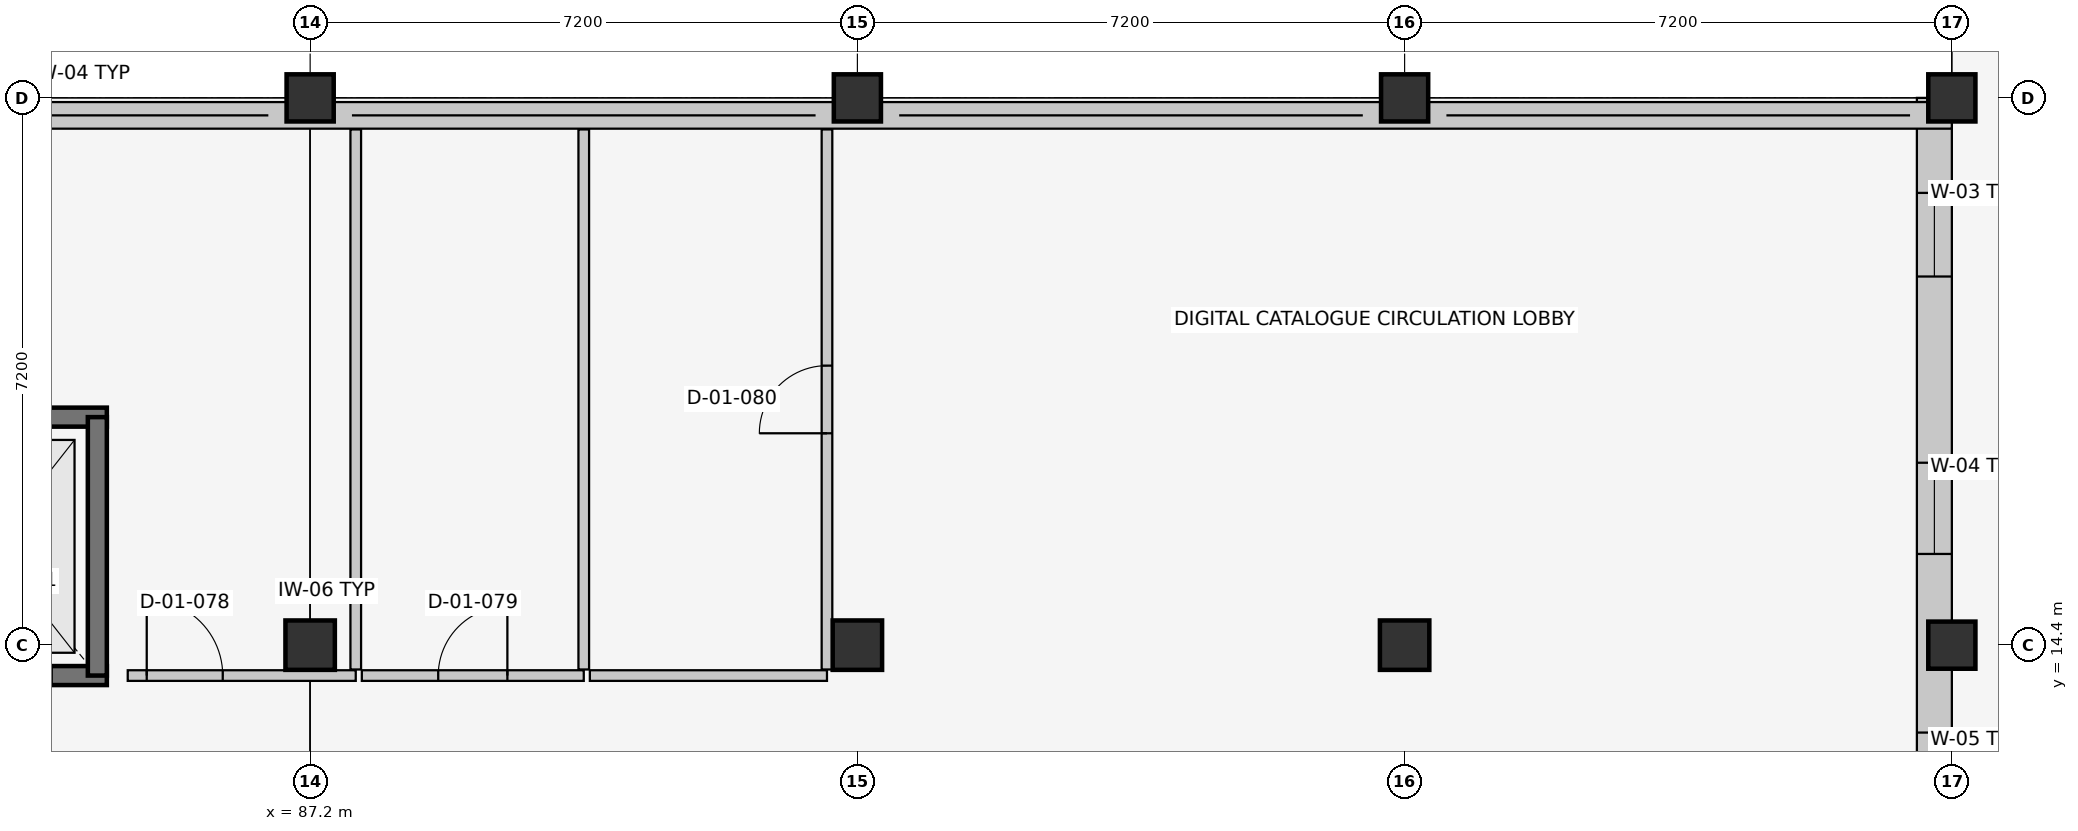
"""IFC4 building model, lengths in metres.
Left out: names, types, materials, properties, quantities, classifications, styles, units other than length and angle.
Written with IfcOpenShell. Run it as: python <this file> out.ifc"""

import sys

from ifc_helpers import new_model, si_unit, direction, frame, frame_2d, origin, origin_2d, place, context, subcontext, project, spatial, rectangle, extrude, element, fill, save


model = new_model("IFC4")
c1 = context("Model", 3, precision=1e-05, world=origin(), true_north=direction((0.0, 1.0)))
c2 = subcontext(c1, "Body", "Model", "MODEL_VIEW")
j1 = project(units=[si_unit("LENGTHUNIT", "METRE"), si_unit("PLANEANGLEUNIT", "RADIAN")], contexts=[c1])
p1 = place(None, origin())
s1 = spatial("IfcSite", under=j1, at=p1, CompositionType="ELEMENT")
p2 = place(p1, origin())
s2 = spatial("IfcBuilding", under=s1, at=p2, CompositionType="ELEMENT")
p3 = place(p2, frame((0.0, 0.0, 5.4)))
s3 = spatial("IfcBuildingStorey", under=s2, at=p3, CompositionType="ELEMENT", Elevation=5.4)
p4 = place(p3, frame((87.2, 14.4, 0.0), z_axis=(0.0, 0.0, 1.0), x_axis=(1.0, 0.0, 0.0)))
e1 = element("IfcColumn", 1, at=p4, inside=s3, PredefinedType="COLUMN", context=c2, shape_type="SweptSolid", body=[
    extrude(rectangle(XDim=0.65, YDim=0.65, at=origin_2d()), origin(), (0.0, 0.0, 1.0), 4.2),
])
p5 = place(p3, frame((87.2, 21.6, 0.0), z_axis=(0.0, 0.0, 1.0), x_axis=(1.0, 0.0, 0.0)))
e2 = element("IfcColumn", 2, at=p5, inside=s3, PredefinedType="COLUMN", context=c2, shape_type="SweptSolid", body=[
    extrude(rectangle(XDim=0.62, YDim=0.62, at=origin_2d()), origin(), (0.0, 0.0, 1.0), 4.2),
])
p6 = place(p3, frame((94.4, 14.4, 0.0), z_axis=(0.0, 0.0, 1.0), x_axis=(1.0, 0.0, 0.0)))
e3 = element("IfcColumn", 3, at=p6, inside=s3, PredefinedType="COLUMN", context=c2, shape_type="SweptSolid", body=[
    extrude(rectangle(XDim=0.65, YDim=0.65, at=origin_2d()), origin(), (0.0, 0.0, 1.0), 4.2),
])
p7 = place(p3, frame((94.4, 21.6, 0.0), z_axis=(0.0, 0.0, 1.0), x_axis=(1.0, 0.0, 0.0)))
e4 = element("IfcColumn", 4, at=p7, inside=s3, PredefinedType="COLUMN", context=c2, shape_type="SweptSolid", body=[
    extrude(rectangle(XDim=0.62, YDim=0.62, at=origin_2d()), origin(), (0.0, 0.0, 1.0), 4.2),
])
p8 = place(p3, frame((101.6, 14.4, 0.0), z_axis=(0.0, 0.0, 1.0), x_axis=(1.0, 0.0, 0.0)))
e5 = element("IfcColumn", 5, at=p8, inside=s3, PredefinedType="COLUMN", context=c2, shape_type="SweptSolid", body=[
    extrude(rectangle(XDim=0.65, YDim=0.65, at=origin_2d()), origin(), (0.0, 0.0, 1.0), 4.2),
])
for number, where, z_axis, x_axis in (
    (6, (101.6, 21.6, 0.0), (0.0, 0.0, 1.0), (1.0, 0.0, 0.0)),
    (7, (108.8, 14.4, 0.0), (0.0, 0.0, 1.0), (1.0, 0.0, 0.0)),
    (8, (108.8, 21.6, 0.0), (0.0, 0.0, 1.0), (1.0, 0.0, 0.0)),
):
    element("IfcColumn", number, at=place(p3, frame(where, z_axis=z_axis, x_axis=x_axis)), inside=s3, PredefinedType="COLUMN", context=c2, shape_type="SweptSolid", body=[
        extrude(rectangle(XDim=0.62, YDim=0.62, at=origin_2d()), origin(), (0.0, 0.0, 1.0), 4.2),
    ])
p9 = place(p3, frame((108.57, 21.6, 0.0), z_axis=(0.0, 0.0, 1.0), x_axis=(0.0, -1.0, 0.0)))
e9 = element("IfcWall", 9, at=p9, inside=s3, PredefinedType="SOLIDWALL", context=c2, shape_type="SweptSolid", body=[
    extrude(rectangle(XDim=21.6, YDim=0.46, at=frame_2d((10.8, 0.0))), origin(), (0.0, 0.0, 1.0), 3.215),
])
p10 = place(p9, frame((1.25, 0.0, 0.9)))
e10 = element("IfcOpeningElement", 10, at=p10, cuts=e9, PredefinedType="OPENING", context=c2, shape_type="SweptSolid", body=[
    extrude(rectangle(XDim=1.1, YDim=1.35, at=frame_2d((0.55, 0.675))), frame((0.0, 0.242, 0.0), z_axis=(0.0, -1.0, 0.0), x_axis=(1.0, 0.0, 0.0)), (0.0, 0.0, 1.0), 0.484),
])
p11 = place(p9, frame((4.8, 0.0, 0.9)))
e11 = element("IfcOpeningElement", 11, at=p11, cuts=e9, PredefinedType="OPENING", context=c2, shape_type="SweptSolid", body=[
    extrude(rectangle(XDim=1.2, YDim=1.35, at=frame_2d((0.6, 0.675))), frame((0.0, 0.242, 0.0), z_axis=(0.0, -1.0, 0.0), x_axis=(1.0, 0.0, 0.0)), (0.0, 0.0, 1.0), 0.484),
])
p12 = place(p9, frame((8.35, 0.0, 0.9)))
e12 = element("IfcOpeningElement", 12, at=p12, cuts=e9, PredefinedType="OPENING", context=c2, shape_type="SweptSolid", body=[
    extrude(rectangle(XDim=1.3, YDim=1.35, at=frame_2d((0.65, 0.675))), frame((0.0, 0.242, 0.0), z_axis=(0.0, -1.0, 0.0), x_axis=(1.0, 0.0, 0.0)), (0.0, 0.0, 1.0), 0.484),
])
p13 = place(p9, frame((11.9, 0.0, 0.9)))
e13 = element("IfcOpeningElement", 13, at=p13, cuts=e9, PredefinedType="OPENING", context=c2, shape_type="SweptSolid", body=[
    extrude(rectangle(XDim=1.4, YDim=1.35, at=frame_2d((0.7, 0.675))), frame((0.0, 0.242, 0.0), z_axis=(0.0, -1.0, 0.0), x_axis=(1.0, 0.0, 0.0)), (0.0, 0.0, 1.0), 0.484),
])
p14 = place(p9, frame((15.725, 0.0, 0.9)))
e14 = element("IfcOpeningElement", 14, at=p14, cuts=e9, PredefinedType="OPENING", context=c2, shape_type="SweptSolid", body=[
    extrude(rectangle(XDim=0.95, YDim=1.45, at=frame_2d((0.475, 0.725))), frame((0.0, 0.242, 0.0), z_axis=(0.0, -1.0, 0.0), x_axis=(1.0, 0.0, 0.0)), (0.0, 0.0, 1.0), 0.484),
])
p15 = place(p9, frame((19.275, 0.0, 0.9)))
e15 = element("IfcOpeningElement", 15, at=p15, cuts=e9, PredefinedType="OPENING", context=c2, shape_type="SweptSolid", body=[
    extrude(rectangle(XDim=1.05, YDim=1.45, at=frame_2d((0.525, 0.725))), frame((0.0, 0.242, 0.0), z_axis=(0.0, -1.0, 0.0), x_axis=(1.0, 0.0, 0.0)), (0.0, 0.0, 1.0), 0.484),
])
p16 = place(p3, frame((58.4, 21.37, 0.0), z_axis=(0.0, 0.0, 1.0), x_axis=(1.0, 0.0, 0.0)))
e16 = element("IfcWall", 16, at=p16, inside=s3, PredefinedType="SOLIDWALL", context=c2, shape_type="SweptSolid", body=[
    extrude(rectangle(XDim=50.4, YDim=0.35, at=frame_2d((25.2, 0.0))), origin(), (0.0, 0.0, 1.0), 0.85),
])
p17 = place(p3, frame((81.475, 14.0, 0.0), z_axis=(0.0, 0.0, 1.0), x_axis=(1.0, 0.0, 0.0)))
e17 = element("IfcWall", 17, at=p17, inside=s3, PredefinedType="SHEAR", context=c2, shape_type="SweptSolid", body=[
    extrude(rectangle(XDim=3.05, YDim=0.25, at=frame_2d((1.525, 0.0))), origin(), (0.0, 0.0, 1.0), 3.95),
])
p18 = place(p17, frame((0.725, 0.0, 0.0)))
e18 = element("IfcOpeningElement", 18, at=p18, cuts=e17, PredefinedType="OPENING", context=c2, shape_type="SweptSolid", body=[
    extrude(rectangle(XDim=1.6, YDim=2.3, at=frame_2d((0.8, 1.15))), frame((0.0, 0.137, 0.0), z_axis=(0.0, -1.0, 0.0), x_axis=(1.0, 0.0, 0.0)), (0.0, 0.0, 1.0), 0.274),
])
p19 = place(p3, frame((84.525, 17.4, 0.0), z_axis=(0.0, 0.0, 1.0), x_axis=(-1.0, 0.0, 0.0)))
e19 = element("IfcWall", 19, at=p19, inside=s3, PredefinedType="SHEAR", context=c2, shape_type="SweptSolid", body=[
    extrude(rectangle(XDim=3.05, YDim=0.25, at=frame_2d((1.525, 0.0))), origin(), (0.0, 0.0, 1.0), 3.95),
])
p20 = place(p3, frame((84.4, 14.0, 0.0), z_axis=(0.0, 0.0, 1.0), x_axis=(0.0, 1.0, 0.0)))
e20 = element("IfcWall", 20, at=p20, inside=s3, PredefinedType="SHEAR", context=c2, shape_type="SweptSolid", body=[
    extrude(rectangle(XDim=3.4, YDim=0.25, at=frame_2d((1.7, 0.0))), origin(), (0.0, 0.0, 1.0), 3.95),
])
p21 = place(p3, frame((84.8, 14.0, 0.0), z_axis=(0.0, 0.0, 1.0), x_axis=(1.0, 0.0, 0.0)))
e21 = element("IfcWall", 21, at=p21, inside=s3, PredefinedType="PARTITIONING", context=c2, shape_type="SweptSolid", body=[
    extrude(rectangle(XDim=3.0, YDim=0.14, at=frame_2d((1.5, 0.0))), origin(), (0.0, 0.0, 1.0), 3.95),
])
p22 = place(p21, frame((0.25, 0.0, 0.0)))
e22 = element("IfcOpeningElement", 22, at=p22, cuts=e21, PredefinedType="OPENING", context=c2, shape_type="SweptSolid", body=[
    extrude(rectangle(XDim=1.0, YDim=2.1, at=frame_2d((0.5, 1.05))), frame((0.0, 0.082, 0.0), z_axis=(0.0, -1.0, 0.0), x_axis=(1.0, 0.0, 0.0)), (0.0, 0.0, 1.0), 0.164),
])
p23 = place(p3, frame((87.8, 14.08, 0.0), z_axis=(0.0, 0.0, 1.0), x_axis=(0.0, 1.0, 0.0)))
e23 = element("IfcWall", 23, at=p23, inside=s3, PredefinedType="PARTITIONING", context=c2, shape_type="SweptSolid", body=[
    extrude(rectangle(XDim=7.105, YDim=0.14, at=frame_2d((3.552, 0.0))), origin(), (0.0, 0.0, 1.0), 3.95),
])
p24 = place(p3, frame((87.88, 14.0, 0.0), z_axis=(0.0, 0.0, 1.0), x_axis=(1.0, 0.0, 0.0)))
e24 = element("IfcWall", 24, at=p24, inside=s3, PredefinedType="PARTITIONING", context=c2, shape_type="SweptSolid", body=[
    extrude(rectangle(XDim=2.92, YDim=0.14, at=frame_2d((1.46, 0.0))), origin(), (0.0, 0.0, 1.0), 3.95),
])
p25 = place(p24, frame((1.005, 0.0, 0.0)))
e25 = element("IfcOpeningElement", 25, at=p25, cuts=e24, PredefinedType="OPENING", context=c2, shape_type="SweptSolid", body=[
    extrude(rectangle(XDim=0.91, YDim=2.06, at=frame_2d((0.455, 1.03))), frame((0.0, 0.082, 0.0), z_axis=(0.0, -1.0, 0.0), x_axis=(1.0, 0.0, 0.0)), (0.0, 0.0, 1.0), 0.164),
])
p26 = place(p3, frame((90.8, 14.08, 0.0), z_axis=(0.0, 0.0, 1.0), x_axis=(0.0, 1.0, 0.0)))
e26 = element("IfcWall", 26, at=p26, inside=s3, PredefinedType="PARTITIONING", context=c2, shape_type="SweptSolid", body=[
    extrude(rectangle(XDim=7.105, YDim=0.14, at=frame_2d((3.552, 0.0))), origin(), (0.0, 0.0, 1.0), 3.605),
])
p27 = place(p3, frame((90.88, 14.0, 0.0), z_axis=(0.0, 0.0, 1.0), x_axis=(1.0, 0.0, 0.0)))
e27 = element("IfcWall", 27, at=p27, inside=s3, PredefinedType="PARTITIONING", context=c2, shape_type="SweptSolid", body=[
    extrude(rectangle(XDim=3.12, YDim=0.14, at=frame_2d((1.56, 0.0))), origin(), (0.0, 0.0, 1.0), 3.95),
])
p28 = place(p3, frame((94.0, 14.08, 0.0), z_axis=(0.0, 0.0, 1.0), x_axis=(0.0, 1.0, 0.0)))
e28 = element("IfcWall", 28, at=p28, inside=s3, PredefinedType="PARTITIONING", context=c2, shape_type="SweptSolid", body=[
    extrude(rectangle(XDim=7.105, YDim=0.14, at=frame_2d((3.552, 0.0))), origin(), (0.0, 0.0, 1.0), 3.95),
])
p29 = place(p28, frame((3.107, 0.0, 0.0)))
e29 = element("IfcOpeningElement", 29, at=p29, cuts=e28, PredefinedType="OPENING", context=c2, shape_type="SweptSolid", body=[
    extrude(rectangle(XDim=0.89, YDim=2.05, at=frame_2d((0.445, 1.025))), frame((0.0, 0.082, 0.0), z_axis=(0.0, -1.0, 0.0), x_axis=(1.0, 0.0, 0.0)), (0.0, 0.0, 1.0), 0.164),
])
p30 = place(p10, origin())
e30 = element("IfcWindow", 30, at=p30, inside=s3, PartitioningType="SINGLE_PANEL", PredefinedType="WINDOW", context=c2, shape_type="SweptSolid", body=[
    extrude(rectangle(XDim=1.1, YDim=1.35, at=frame_2d((0.55, 0.675))), frame((0.0, 0.03, 0.0), z_axis=(0.0, -1.0, 0.0), x_axis=(1.0, 0.0, 0.0)), (0.0, 0.0, 1.0), 0.06),
])
fill(e10, e30)
p31 = place(p11, origin())
e31 = element("IfcWindow", 31, at=p31, inside=s3, PartitioningType="SINGLE_PANEL", PredefinedType="WINDOW", context=c2, shape_type="SweptSolid", body=[
    extrude(rectangle(XDim=1.2, YDim=1.35, at=frame_2d((0.6, 0.675))), frame((0.0, 0.03, 0.0), z_axis=(0.0, -1.0, 0.0), x_axis=(1.0, 0.0, 0.0)), (0.0, 0.0, 1.0), 0.06),
])
fill(e11, e31)
p32 = place(p12, origin())
e32 = element("IfcWindow", 32, at=p32, inside=s3, PartitioningType="SINGLE_PANEL", PredefinedType="WINDOW", context=c2, shape_type="SweptSolid", body=[
    extrude(rectangle(XDim=1.3, YDim=1.35, at=frame_2d((0.65, 0.675))), frame((0.0, 0.03, 0.0), z_axis=(0.0, -1.0, 0.0), x_axis=(1.0, 0.0, 0.0)), (0.0, 0.0, 1.0), 0.06),
])
fill(e12, e32)
p33 = place(p18, origin())
e33 = element("IfcDoor", 33, at=p33, inside=s3, OperationType="DOUBLE_DOOR_SLIDING", PredefinedType="DOOR", context=c2, shape_type="SweptSolid", body=[
    extrude(rectangle(XDim=1.6, YDim=2.3, at=frame_2d((0.8, 1.15))), frame((0.0, 0.025, 0.0), z_axis=(0.0, -1.0, 0.0), x_axis=(1.0, 0.0, 0.0)), (0.0, 0.0, 1.0), 0.05),
])
fill(e18, e33)
p34 = place(p22, origin())
e34 = element("IfcDoor", 34, at=p34, inside=s3, OperationType="SINGLE_SWING_LEFT", PredefinedType="DOOR", context=c2, shape_type="SweptSolid", body=[
    extrude(rectangle(XDim=1.0, YDim=2.1, at=frame_2d((0.5, 1.05))), frame((0.0, 0.025, 0.0), z_axis=(0.0, -1.0, 0.0), x_axis=(1.0, 0.0, 0.0)), (0.0, 0.0, 1.0), 0.05),
])
fill(e22, e34)
p35 = place(p25, origin())
e35 = element("IfcDoor", 35, at=p35, inside=s3, OperationType="SINGLE_SWING_RIGHT", PredefinedType="DOOR", context=c2, shape_type="SweptSolid", body=[
    extrude(rectangle(XDim=0.91, YDim=2.06, at=frame_2d((0.455, 1.03))), frame((0.0, 0.025, 0.0), z_axis=(0.0, -1.0, 0.0), x_axis=(1.0, 0.0, 0.0)), (0.0, 0.0, 1.0), 0.05),
])
fill(e25, e35)
p36 = place(p29, origin())
e36 = element("IfcDoor", 36, at=p36, inside=s3, OperationType="SINGLE_SWING_LEFT", PredefinedType="DOOR", context=c2, shape_type="SweptSolid", body=[
    extrude(rectangle(XDim=0.89, YDim=2.05, at=frame_2d((0.445, 1.025))), frame((0.0, 0.025, 0.0), z_axis=(0.0, -1.0, 0.0), x_axis=(1.0, 0.0, 0.0)), (0.0, 0.0, 1.0), 0.05),
])
fill(e29, e36)
save(model, sys.argv[1])
